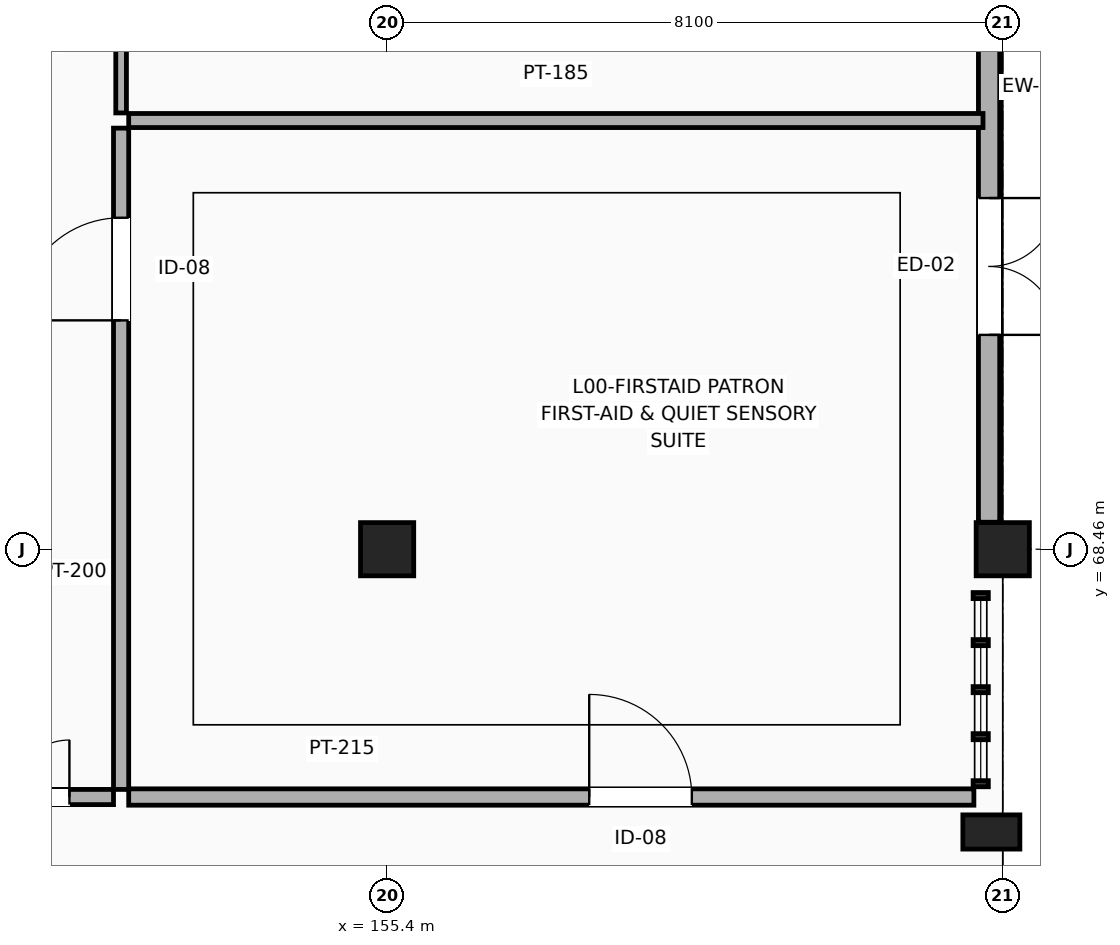
"""IFC4 building model, lengths in metres.
Left out: names, types, materials, properties, quantities, classifications, styles, units other than length and angle.
Written with IfcOpenShell. Run it as: python <this file> out.ifc"""

import sys

from ifc_helpers import new_model, si_unit, direction, frame, frame_2d, origin, origin_2d, place, context, subcontext, project, spatial, rectangle, extrude, element, fill, save


model = new_model("IFC4")
c1 = context("Model", 3, precision=1e-05, world=origin(), true_north=direction((0.0, 1.0)))
c2 = subcontext(c1, "Body", "Model", "MODEL_VIEW")
j1 = project(units=[si_unit("LENGTHUNIT", "METRE"), si_unit("PLANEANGLEUNIT", "RADIAN")], contexts=[c1])
p1 = place(None, origin())
s1 = spatial("IfcSite", under=j1, at=p1, CompositionType="ELEMENT")
p2 = place(p1, origin())
s2 = spatial("IfcBuilding", under=s1, at=p2, CompositionType="ELEMENT")
p3 = place(p2, origin())
s3 = spatial("IfcBuildingStorey", under=s2, at=p3, CompositionType="ELEMENT", Elevation=0.0)
p4 = place(p3, frame((163.35, 64.74, 0.0), z_axis=(0.0, 0.0, 1.0), x_axis=(0.0, 1.0, 0.0)))
e1 = element("IfcColumn", 1, at=p4, inside=s3, PredefinedType="PILASTER", context=c2, shape_type="SweptSolid", body=[
    extrude(rectangle(XDim=0.45, YDim=0.75, at=origin_2d()), origin(), (0.0, 0.0, 1.0), 5.4),
])
for number, where, z_axis, x_axis in (
    (2, (155.4, 68.46, 0.0), (0.0, 0.0, 1.0), (1.0, 0.0, 0.0)),
    (3, (163.5, 68.46, 0.0), (0.0, 0.0, 1.0), (1.0, 0.0, 0.0)),
):
    element("IfcColumn", number, at=place(p3, frame(where, z_axis=z_axis, x_axis=x_axis)), inside=s3, PredefinedType="COLUMN", context=c2, shape_type="SweptSolid", body=[
        extrude(rectangle(XDim=0.7, YDim=0.7, at=origin_2d()), origin(), (0.0, 0.0, 1.0), 5.4),
    ])
p5 = place(p3, frame((163.32, 75.545, 0.0), z_axis=(0.0, 0.0, 1.0), x_axis=(0.0, -1.0, 0.0)))
e4 = element("IfcWall", 4, at=p5, inside=s3, PredefinedType="SOLIDWALL", context=c2, shape_type="SweptSolid", body=[
    extrude(rectangle(XDim=6.73, YDim=0.28, at=frame_2d((3.365, 0.0))), origin(), (0.0, 0.0, 1.0), 4.787),
])
p6 = place(p5, frame((2.465, 0.0, 0.0)))
e5 = element("IfcOpeningElement", 5, at=p6, cuts=e4, PredefinedType="OPENING", context=c2, shape_type="SweptSolid", body=[
    extrude(rectangle(XDim=1.8, YDim=2.4, at=frame_2d((0.9, 1.2))), frame((0.0, 0.15, 0.0), z_axis=(0.0, -1.0, 0.0), x_axis=(1.0, 0.0, 0.0)), (0.0, 0.0, 1.0), 0.3),
])
p7 = place(p3, frame((152.0, 65.2, 0.0), z_axis=(0.0, 0.0, 1.0), x_axis=(1.0, 0.0, 0.0)))
e6 = element("IfcWall", 6, at=p7, inside=s3, PredefinedType="PARTITIONING", context=c2, shape_type="SweptSolid", body=[
    extrude(rectangle(XDim=11.12, YDim=0.215, at=frame_2d((5.56, 0.0))), origin(), (0.0, 0.0, 1.0), 4.337),
])
p8 = place(p7, frame((6.059, 0.0, 0.0)))
e7 = element("IfcOpeningElement", 7, at=p8, cuts=e6, PredefinedType="OPENING", context=c2, shape_type="SweptSolid", body=[
    extrude(rectangle(XDim=1.35, YDim=2.2, at=frame_2d((0.675, 1.1))), frame((0.0, 0.117, 0.0), z_axis=(0.0, -1.0, 0.0), x_axis=(1.0, 0.0, 0.0)), (0.0, 0.0, 1.0), 0.235),
])
p9 = place(p3, frame((148.6, 65.2, 0.0), z_axis=(0.0, 0.0, 1.0), x_axis=(1.0, 0.0, 0.0)))
e8 = element("IfcWall", 8, at=p9, inside=s3, PredefinedType="PARTITIONING", context=c2, shape_type="SweptSolid", body=[
    extrude(rectangle(XDim=3.2, YDim=0.2, at=frame_2d((1.6, 0.0))), origin(), (0.0, 0.0, 1.0), 4.637),
])
p10 = place(p9, frame((1.12, 0.0, 0.0)))
e9 = element("IfcOpeningElement", 9, at=p10, cuts=e8, PredefinedType="OPENING", context=c2, shape_type="SweptSolid", body=[
    extrude(rectangle(XDim=1.5, YDim=2.2, at=frame_2d((0.75, 1.1))), frame((0.0, 0.11, 0.0), z_axis=(0.0, -1.0, 0.0), x_axis=(1.0, 0.0, 0.0)), (0.0, 0.0, 1.0), 0.22),
])
p11 = place(p3, frame((151.9, 65.3, 0.0), z_axis=(0.0, 0.0, 1.0), x_axis=(0.0, 1.0, 0.0)))
e10 = element("IfcWall", 10, at=p11, inside=s3, PredefinedType="PARTITIONING", context=c2, shape_type="SweptSolid", body=[
    extrude(rectangle(XDim=8.7, YDim=0.2, at=frame_2d((4.35, 0.0))), origin(), (0.0, 0.0, 1.0), 4.137),
])
p12 = place(p11, frame((6.171, 0.0, 0.0)))
e11 = element("IfcOpeningElement", 11, at=p12, cuts=e10, PredefinedType="OPENING", context=c2, shape_type="SweptSolid", body=[
    extrude(rectangle(XDim=1.35, YDim=2.2, at=frame_2d((0.675, 1.1))), frame((0.0, 0.11, 0.0), z_axis=(0.0, -1.0, 0.0), x_axis=(1.0, 0.0, 0.0)), (0.0, 0.0, 1.0), 0.22),
])
p13 = place(p3, frame((152.0, 74.1, 0.0), z_axis=(0.0, 0.0, 1.0), x_axis=(1.0, 0.0, 0.0)))
e12 = element("IfcWall", 12, at=p13, inside=s3, PredefinedType="PARTITIONING", context=c2, shape_type="SweptSolid", body=[
    extrude(rectangle(XDim=11.24, YDim=0.185, at=frame_2d((5.62, 0.0))), origin(), (0.0, 0.0, 1.0), 4.337),
])
p14 = place(p3, frame((151.9, 74.2, 0.0), z_axis=(0.0, 0.0, 1.0), x_axis=(0.0, 1.0, 0.0)))
e13 = element("IfcWall", 13, at=p14, inside=s3, PredefinedType="PARTITIONING", context=c2, shape_type="SweptSolid", body=[
    extrude(rectangle(XDim=4.8, YDim=0.14, at=frame_2d((2.4, 0.0))), origin(), (0.0, 0.0, 1.0), 4.137),
])
p15 = place(p14, frame((2.27, 0.0, 0.0)))
e14 = element("IfcOpeningElement", 14, at=p15, cuts=e13, PredefinedType="OPENING", context=c2, shape_type="SweptSolid", body=[
    extrude(rectangle(XDim=1.95, YDim=2.45, at=frame_2d((0.975, 1.225))), frame((0.0, 0.08, 0.0), z_axis=(0.0, -1.0, 0.0), x_axis=(1.0, 0.0, 0.0)), (0.0, 0.0, 1.0), 0.16),
])
p16 = place(p6, origin())
e15 = element("IfcDoor", 15, at=p16, inside=s3, OperationType="DOUBLE_DOOR_SINGLE_SWING", PredefinedType="DOOR", context=c2, shape_type="SweptSolid", body=[
    extrude(rectangle(XDim=1.8, YDim=2.4, at=frame_2d((0.9, 1.2))), frame((0.0, 0.025, 0.0), z_axis=(0.0, -1.0, 0.0), x_axis=(1.0, 0.0, 0.0)), (0.0, 0.0, 1.0), 0.05),
])
fill(e5, e15)
p17 = place(p8, origin())
e16 = element("IfcDoor", 16, at=p17, inside=s3, OperationType="SINGLE_SWING_LEFT", PredefinedType="DOOR", context=c2, shape_type="SweptSolid", body=[
    extrude(rectangle(XDim=1.35, YDim=2.2, at=frame_2d((0.675, 1.1))), frame((0.0, 0.025, 0.0), z_axis=(0.0, -1.0, 0.0), x_axis=(1.0, 0.0, 0.0)), (0.0, 0.0, 1.0), 0.05),
])
fill(e7, e16)
p18 = place(p10, origin())
e17 = element("IfcDoor", 17, at=p18, inside=s3, OperationType="DOUBLE_DOOR_SINGLE_SWING", PredefinedType="DOOR", context=c2, shape_type="SweptSolid", body=[
    extrude(rectangle(XDim=1.5, YDim=2.2, at=frame_2d((0.75, 1.1))), frame((0.0, 0.025, 0.0), z_axis=(0.0, -1.0, 0.0), x_axis=(1.0, 0.0, 0.0)), (0.0, 0.0, 1.0), 0.05),
])
fill(e9, e17)
p19 = place(p12, origin())
e18 = element("IfcDoor", 18, at=p19, inside=s3, OperationType="SINGLE_SWING_LEFT", PredefinedType="DOOR", context=c2, shape_type="SweptSolid", body=[
    extrude(rectangle(XDim=1.35, YDim=2.2, at=frame_2d((0.675, 1.1))), frame((0.0, 0.025, 0.0), z_axis=(0.0, -1.0, 0.0), x_axis=(1.0, 0.0, 0.0)), (0.0, 0.0, 1.0), 0.05),
])
fill(e11, e18)
save(model, sys.argv[1])
